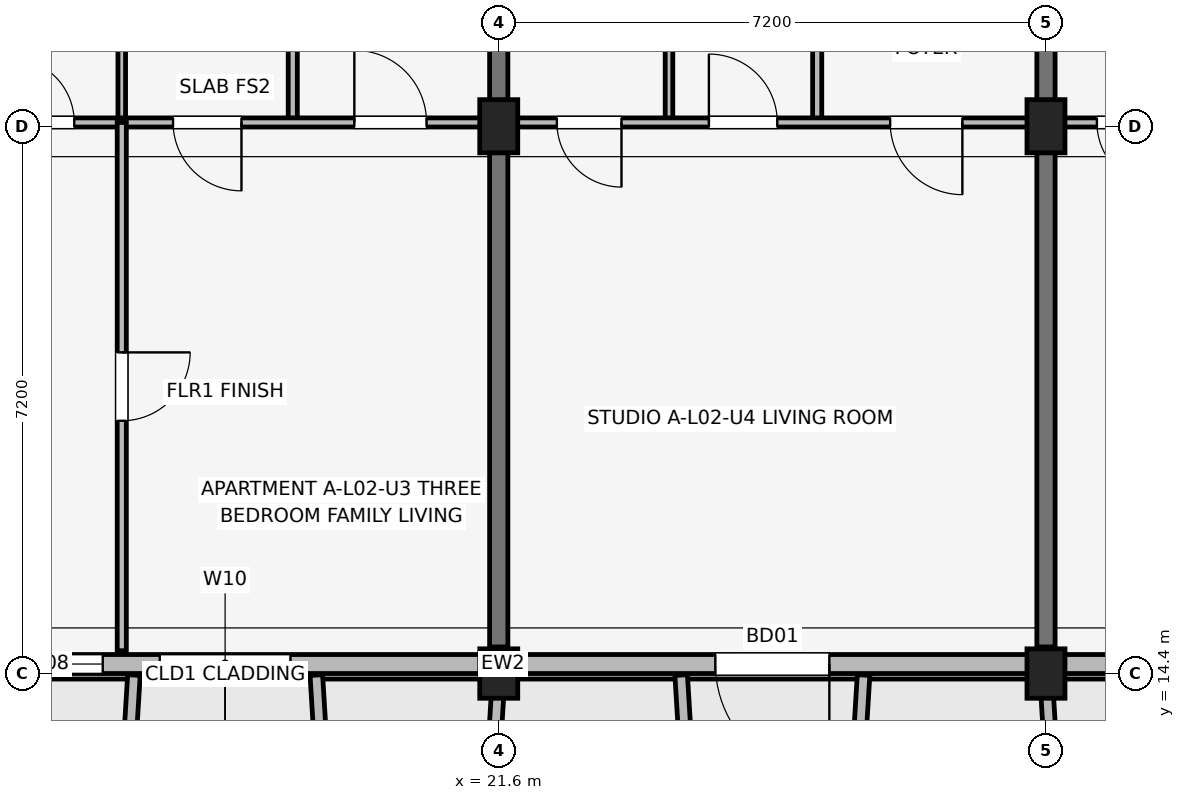
"""IFC4 building model, lengths in metres.
Left out: names, types, materials, properties, quantities, classifications, styles, units other than length and angle.
Written with IfcOpenShell. Run it as: python <this file> out.ifc"""

import sys

from ifc_helpers import new_model, si_unit, direction, frame, frame_2d, origin, origin_2d, place, context, subcontext, project, spatial, rectangle, extrude, element, fill, save


model = new_model("IFC4")
c1 = context("Model", 3, precision=1e-05, world=origin(), true_north=direction((0.0, 1.0)))
c2 = subcontext(c1, "Body", "Model", "MODEL_VIEW")
j1 = project(units=[si_unit("LENGTHUNIT", "METRE"), si_unit("PLANEANGLEUNIT", "RADIAN")], contexts=[c1])
p1 = place(None, origin())
s1 = spatial("IfcSite", under=j1, at=p1, CompositionType="ELEMENT")
p2 = place(p1, origin())
s2 = spatial("IfcBuilding", under=s1, at=p2, CompositionType="ELEMENT")
p3 = place(p2, frame((0.0, 0.0, 8.7)))
s3 = spatial("IfcBuildingStorey", under=s2, at=p3, CompositionType="ELEMENT", Elevation=8.7)
p4 = place(p3, frame((21.6, 14.4, 0.0), z_axis=(0.0, 0.0, 1.0), x_axis=(1.0, 0.0, 0.0)))
e1 = element("IfcColumn", 1, at=p4, inside=s3, PredefinedType="COLUMN", context=c2, shape_type="SweptSolid", body=[
    extrude(rectangle(XDim=0.5, YDim=0.65, at=origin_2d()), origin(), (0.0, 0.0, 1.0), 3.15),
])
p5 = place(p3, frame((21.6, 21.6, 0.0), z_axis=(0.0, 0.0, 1.0), x_axis=(1.0, 0.0, 0.0)))
e2 = element("IfcColumn", 2, at=p5, inside=s3, PredefinedType="COLUMN", context=c2, shape_type="SweptSolid", body=[
    extrude(rectangle(XDim=0.5, YDim=0.7, at=origin_2d()), origin(), (0.0, 0.0, 1.0), 3.15),
])
p6 = place(p3, frame((28.8, 14.4, 0.0), z_axis=(0.0, 0.0, 1.0), x_axis=(1.0, 0.0, 0.0)))
e3 = element("IfcColumn", 3, at=p6, inside=s3, PredefinedType="COLUMN", context=c2, shape_type="SweptSolid", body=[
    extrude(rectangle(XDim=0.5, YDim=0.65, at=origin_2d()), origin(), (0.0, 0.0, 1.0), 3.15),
])
p7 = place(p3, frame((28.8, 21.6, 0.0), z_axis=(0.0, 0.0, 1.0), x_axis=(1.0, 0.0, 0.0)))
e4 = element("IfcColumn", 4, at=p7, inside=s3, PredefinedType="COLUMN", context=c2, shape_type="SweptSolid", body=[
    extrude(rectangle(XDim=0.5, YDim=0.7, at=origin_2d()), origin(), (0.0, 0.0, 1.0), 3.15),
])
for number, where, z_axis, x_axis in (
    (5, (21.6, 14.75, 0.0), (0.0, 0.0, 1.0), (0.0, 1.0, 0.0)),
    (6, (28.8, 14.75, 0.0), (0.0, 0.0, 1.0), (0.0, 1.0, 0.0)),
):
    element("IfcWall", number, at=place(p3, frame(where, z_axis=z_axis, x_axis=x_axis)), inside=s3, PredefinedType="SHEAR", context=c2, shape_type="SweptSolid", body=[
        extrude(rectangle(XDim=9.4, YDim=0.24, at=frame_2d((4.7, 0.0))), origin(), (0.0, 0.0, 1.0), 3.15),
    ])
p8 = place(p3, frame((3.4, 14.525, 0.0), z_axis=(0.0, 0.0, 1.0), x_axis=(1.0, 0.0, 0.0)))
e7 = element("IfcWall", 7, at=p8, inside=s3, PredefinedType="SOLIDWALL", context=c2, shape_type="SweptSolid", body=[
    extrude(rectangle(XDim=29.2, YDim=0.25, at=frame_2d((14.6, 0.0))), origin(), (0.0, 0.0, 1.0), 2.43),
])
p9 = place(p8, frame((8.225, 0.0, 0.0), z_axis=(0.0, 0.0, 1.0), x_axis=(-1.0, 0.0, 0.0)))
e8 = element("IfcOpeningElement", 8, at=p9, cuts=e7, PredefinedType="OPENING", context=c2, shape_type="SweptSolid", body=[
    extrude(rectangle(XDim=1.65, YDim=2.15, at=frame_2d((0.825, 1.075))), frame((0.0, 0.135, 0.0), z_axis=(0.0, -1.0, 0.0), x_axis=(1.0, 0.0, 0.0)), (0.0, 0.0, 1.0), 0.27),
])
p10 = place(p8, frame((22.55, 0.0, 0.0), z_axis=(0.0, 0.0, 1.0), x_axis=(-1.0, 0.0, 0.0)))
e9 = element("IfcOpeningElement", 9, at=p10, cuts=e7, PredefinedType="OPENING", context=c2, shape_type="SweptSolid", body=[
    extrude(rectangle(XDim=1.5, YDim=2.15, at=frame_2d((0.75, 1.075))), frame((0.0, 0.135, 0.0), z_axis=(0.0, -1.0, 0.0), x_axis=(1.0, 0.0, 0.0)), (0.0, 0.0, 1.0), 0.27),
])
p11 = place(p8, frame((2.155, 0.0, 0.75)))
e10 = element("IfcOpeningElement", 10, at=p11, cuts=e7, PredefinedType="OPENING", context=c2, shape_type="SweptSolid", body=[
    extrude(rectangle(XDim=1.22, YDim=1.5, at=frame_2d((0.61, 0.75))), frame((0.0, 0.135, 0.0), z_axis=(0.0, -1.0, 0.0), x_axis=(1.0, 0.0, 0.0)), (0.0, 0.0, 1.0), 0.27),
])
p12 = place(p8, frame((4.39, 0.0, 0.75)))
e11 = element("IfcOpeningElement", 11, at=p12, cuts=e7, PredefinedType="OPENING", context=c2, shape_type="SweptSolid", body=[
    extrude(rectangle(XDim=1.34, YDim=1.55, at=frame_2d((0.67, 0.775))), frame((0.0, 0.135, 0.0), z_axis=(0.0, -1.0, 0.0), x_axis=(1.0, 0.0, 0.0)), (0.0, 0.0, 1.0), 0.27),
])
p13 = place(p8, frame((11.53, 0.0, 0.75)))
e12 = element("IfcOpeningElement", 12, at=p13, cuts=e7, PredefinedType="OPENING", context=c2, shape_type="SweptSolid", body=[
    extrude(rectangle(XDim=1.46, YDim=1.55, at=frame_2d((0.73, 0.775))), frame((0.0, 0.135, 0.0), z_axis=(0.0, -1.0, 0.0), x_axis=(1.0, 0.0, 0.0)), (0.0, 0.0, 1.0), 0.27),
])
p14 = place(p8, frame((13.74, 0.0, 0.7)))
e13 = element("IfcOpeningElement", 13, at=p14, cuts=e7, PredefinedType="OPENING", context=c2, shape_type="SweptSolid", body=[
    extrude(rectangle(XDim=1.72, YDim=1.6, at=frame_2d((0.86, 0.8))), frame((0.0, 0.135, 0.0), z_axis=(0.0, -1.0, 0.0), x_axis=(1.0, 0.0, 0.0)), (0.0, 0.0, 1.0), 0.27),
])
p15 = place(p8, frame((26.205, 0.0, 0.75)))
e14 = element("IfcOpeningElement", 14, at=p15, cuts=e7, PredefinedType="OPENING", context=c2, shape_type="SweptSolid", body=[
    extrude(rectangle(XDim=0.72, YDim=1.35, at=frame_2d((0.36, 0.675))), frame((0.0, 0.135, 0.0), z_axis=(0.0, -1.0, 0.0), x_axis=(1.0, 0.0, 0.0)), (0.0, 0.0, 1.0), 0.27),
])
for number, where, z_axis, x_axis in (
    (15, (16.8, 14.38, 0.0), (0.0, 0.0, 1.0), (-0.061, -0.998, 0.0)),
    (16, (19.2, 14.38, 0.0), (0.0, 0.0, 1.0), (0.061, -0.998, 0.0)),
):
    element("IfcWall", number, at=place(p3, frame(where, z_axis=z_axis, x_axis=x_axis)), inside=s3, PredefinedType="ELEMENTEDWALL", context=c2, shape_type="SweptSolid", body=[
        extrude(rectangle(XDim=1.964, YDim=0.165, at=frame_2d((0.982, 0.0))), origin(), (0.0, 0.0, 1.0), 2.58),
    ])
p16 = place(p3, frame((21.6, 14.38, 0.0), z_axis=(0.0, 0.0, 1.0), x_axis=(-0.061170732449, -0.998127317276, 0.0)))
e17 = element("IfcWall", 17, at=p16, inside=s3, PredefinedType="ELEMENTEDWALL", context=c2, shape_type="SweptSolid", body=[
    extrude(rectangle(XDim=1.964, YDim=0.165, at=frame_2d((0.982, 0.0))), origin(), (0.0, 0.0, 1.0), 2.95),
])
for number, where, z_axis, x_axis in (
    (18, (24.0, 14.38, 0.0), (0.0, 0.0, 1.0), (0.061, -0.998, 0.0)),
    (19, (26.4, 14.38, 0.0), (0.0, 0.0, 1.0), (-0.061, -0.998, 0.0)),
):
    element("IfcWall", number, at=place(p3, frame(where, z_axis=z_axis, x_axis=x_axis)), inside=s3, PredefinedType="ELEMENTEDWALL", context=c2, shape_type="SweptSolid", body=[
        extrude(rectangle(XDim=1.964, YDim=0.165, at=frame_2d((0.982, 0.0))), origin(), (0.0, 0.0, 1.0), 2.45),
    ])
p17 = place(p3, frame((28.8, 14.38, 0.0), z_axis=(0.0, 0.0, 1.0), x_axis=(0.061046865508, -0.998134900808, 0.0)))
e20 = element("IfcWall", 20, at=p17, inside=s3, PredefinedType="ELEMENTEDWALL", context=c2, shape_type="SweptSolid", body=[
    extrude(rectangle(XDim=1.964, YDim=0.165, at=frame_2d((0.982, 0.0))), origin(), (0.0, 0.0, 1.0), 2.95),
])
p18 = place(p3, frame((16.64, 21.65, 0.0), z_axis=(0.0, 0.0, 1.0), x_axis=(0.0, 1.0, 0.0)))
e21 = element("IfcWall", 21, at=p18, inside=s3, PredefinedType="PARTITIONING", context=c2, shape_type="SweptSolid", body=[
    extrude(rectangle(XDim=2.65, YDim=0.1, at=frame_2d((1.325, 0.0))), origin(), (0.0, 0.0, 1.0), 2.375),
])
p19 = place(p3, frame((18.89, 21.65, 0.0), z_axis=(0.0, 0.0, 1.0), x_axis=(0.0, 1.0, 0.0)))
e22 = element("IfcWall", 22, at=p19, inside=s3, PredefinedType="PARTITIONING", context=c2, shape_type="SweptSolid", body=[
    extrude(rectangle(XDim=2.65, YDim=0.12, at=frame_2d((1.325, 0.0))), origin(), (0.0, 0.0, 1.0), 2.375),
])
p20 = place(p3, frame((14.54, 21.65, 0.0), z_axis=(0.0, 0.0, 1.0), x_axis=(1.0, 0.0, 0.0)))
e23 = element("IfcWall", 23, at=p20, inside=s3, PredefinedType="PARTITIONING", context=c2, shape_type="SweptSolid", body=[
    extrude(rectangle(XDim=6.92, YDim=0.12, at=frame_2d((3.46, 0.0))), origin(), (0.0, 0.0, 1.0), 2.375),
])
p21 = place(p20, frame((0.625, 0.0, 0.0)))
e24 = element("IfcOpeningElement", 24, at=p21, cuts=e23, PredefinedType="OPENING", context=c2, shape_type="SweptSolid", body=[
    extrude(rectangle(XDim=0.85, YDim=2.08, at=frame_2d((0.425, 1.04))), frame((0.0, 0.07, 0.0), z_axis=(0.0, -1.0, 0.0), x_axis=(1.0, 0.0, 0.0)), (0.0, 0.0, 1.0), 0.14),
])
p22 = place(p20, frame((3.675, 0.0, 0.0), z_axis=(0.0, 0.0, 1.0), x_axis=(-1.0, 0.0, 0.0)))
e25 = element("IfcOpeningElement", 25, at=p22, cuts=e23, PredefinedType="OPENING", context=c2, shape_type="SweptSolid", body=[
    extrude(rectangle(XDim=0.9, YDim=2.08, at=frame_2d((0.45, 1.04))), frame((0.0, 0.07, 0.0), z_axis=(0.0, -1.0, 0.0), x_axis=(1.0, 0.0, 0.0)), (0.0, 0.0, 1.0), 0.14),
])
p23 = place(p20, frame((5.16, 0.0, 0.0)))
e26 = element("IfcOpeningElement", 26, at=p23, cuts=e23, PredefinedType="OPENING", context=c2, shape_type="SweptSolid", body=[
    extrude(rectangle(XDim=0.95, YDim=2.08, at=frame_2d((0.475, 1.04))), frame((0.0, 0.07, 0.0), z_axis=(0.0, -1.0, 0.0), x_axis=(1.0, 0.0, 0.0)), (0.0, 0.0, 1.0), 0.14),
])
p24 = place(p3, frame((16.64, 14.7, 0.0), z_axis=(0.0, 0.0, 1.0), x_axis=(0.0, 1.0, 0.0)))
e27 = element("IfcWall", 27, at=p24, inside=s3, PredefinedType="PARTITIONING", context=c2, shape_type="SweptSolid", body=[
    extrude(rectangle(XDim=6.95, YDim=0.12, at=frame_2d((3.475, 0.0))), origin(), (0.0, 0.0, 1.0), 2.375),
])
p25 = place(p24, frame((3.925, 0.0, 0.0), z_axis=(0.0, 0.0, 1.0), x_axis=(-1.0, 0.0, 0.0)))
e28 = element("IfcOpeningElement", 28, at=p25, cuts=e27, PredefinedType="OPENING", context=c2, shape_type="SweptSolid", body=[
    extrude(rectangle(XDim=0.9, YDim=2.08, at=frame_2d((0.45, 1.04))), frame((0.0, 0.07, 0.0), z_axis=(0.0, -1.0, 0.0), x_axis=(1.0, 0.0, 0.0)), (0.0, 0.0, 1.0), 0.14),
])
p26 = place(p3, frame((23.84, 21.65, 0.0), z_axis=(0.0, 0.0, 1.0), x_axis=(0.0, 1.0, 0.0)))
e29 = element("IfcWall", 29, at=p26, inside=s3, PredefinedType="PARTITIONING", context=c2, shape_type="SweptSolid", body=[
    extrude(rectangle(XDim=2.65, YDim=0.1, at=frame_2d((1.325, 0.0))), origin(), (0.0, 0.0, 1.0), 2.375),
])
p27 = place(p3, frame((25.79, 21.65, 0.0), z_axis=(0.0, 0.0, 1.0), x_axis=(0.0, 1.0, 0.0)))
e30 = element("IfcWall", 30, at=p27, inside=s3, PredefinedType="PARTITIONING", context=c2, shape_type="SweptSolid", body=[
    extrude(rectangle(XDim=2.65, YDim=0.12, at=frame_2d((1.325, 0.0))), origin(), (0.0, 0.0, 1.0), 2.375),
])
p28 = place(p3, frame((21.74, 21.65, 0.0), z_axis=(0.0, 0.0, 1.0), x_axis=(1.0, 0.0, 0.0)))
e31 = element("IfcWall", 31, at=p28, inside=s3, PredefinedType="PARTITIONING", context=c2, shape_type="SweptSolid", body=[
    extrude(rectangle(XDim=6.92, YDim=0.12, at=frame_2d((3.46, 0.0))), origin(), (0.0, 0.0, 1.0), 2.375),
])
p29 = place(p28, frame((1.475, 0.0, 0.0), z_axis=(0.0, 0.0, 1.0), x_axis=(-1.0, 0.0, 0.0)))
e32 = element("IfcOpeningElement", 32, at=p29, cuts=e31, PredefinedType="OPENING", context=c2, shape_type="SweptSolid", body=[
    extrude(rectangle(XDim=0.85, YDim=2.08, at=frame_2d((0.425, 1.04))), frame((0.0, 0.07, 0.0), z_axis=(0.0, -1.0, 0.0), x_axis=(1.0, 0.0, 0.0)), (0.0, 0.0, 1.0), 0.14),
])
p30 = place(p28, frame((2.625, 0.0, 0.0)))
e33 = element("IfcOpeningElement", 33, at=p30, cuts=e31, PredefinedType="OPENING", context=c2, shape_type="SweptSolid", body=[
    extrude(rectangle(XDim=0.9, YDim=2.08, at=frame_2d((0.45, 1.04))), frame((0.0, 0.07, 0.0), z_axis=(0.0, -1.0, 0.0), x_axis=(1.0, 0.0, 0.0)), (0.0, 0.0, 1.0), 0.14),
])
p31 = place(p28, frame((5.96, 0.0, 0.0), z_axis=(0.0, 0.0, 1.0), x_axis=(-1.0, 0.0, 0.0)))
e34 = element("IfcOpeningElement", 34, at=p31, cuts=e31, PredefinedType="OPENING", context=c2, shape_type="SweptSolid", body=[
    extrude(rectangle(XDim=0.95, YDim=2.08, at=frame_2d((0.475, 1.04))), frame((0.0, 0.07, 0.0), z_axis=(0.0, -1.0, 0.0), x_axis=(1.0, 0.0, 0.0)), (0.0, 0.0, 1.0), 0.14),
])
p32 = place(p3, frame((28.94, 21.65, 0.0), z_axis=(0.0, 0.0, 1.0), x_axis=(1.0, 0.0, 0.0)))
e35 = element("IfcWall", 35, at=p32, inside=s3, PredefinedType="PARTITIONING", context=c2, shape_type="SweptSolid", body=[
    extrude(rectangle(XDim=6.92, YDim=0.12, at=frame_2d((3.46, 0.0))), origin(), (0.0, 0.0, 1.0), 2.375),
])
p33 = place(p32, frame((1.38, 0.0, 0.0), z_axis=(0.0, 0.0, 1.0), x_axis=(-1.0, 0.0, 0.0)))
e36 = element("IfcOpeningElement", 36, at=p33, cuts=e35, PredefinedType="OPENING", context=c2, shape_type="SweptSolid", body=[
    extrude(rectangle(XDim=0.85, YDim=2.08, at=frame_2d((0.425, 1.04))), frame((0.0, 0.07, 0.0), z_axis=(0.0, -1.0, 0.0), x_axis=(1.0, 0.0, 0.0)), (0.0, 0.0, 1.0), 0.14),
])
p34 = place(p32, frame((2.285, 0.0, 0.0)))
e37 = element("IfcOpeningElement", 37, at=p34, cuts=e35, PredefinedType="OPENING", context=c2, shape_type="SweptSolid", body=[
    extrude(rectangle(XDim=0.9, YDim=2.08, at=frame_2d((0.45, 1.04))), frame((0.0, 0.07, 0.0), z_axis=(0.0, -1.0, 0.0), x_axis=(1.0, 0.0, 0.0)), (0.0, 0.0, 1.0), 0.14),
])
p35 = place(p32, frame((4.86, 0.0, 0.0), z_axis=(0.0, 0.0, 1.0), x_axis=(-1.0, 0.0, 0.0)))
e38 = element("IfcOpeningElement", 38, at=p35, cuts=e35, PredefinedType="OPENING", context=c2, shape_type="SweptSolid", body=[
    extrude(rectangle(XDim=0.95, YDim=2.08, at=frame_2d((0.475, 1.04))), frame((0.0, 0.07, 0.0), z_axis=(0.0, -1.0, 0.0), x_axis=(1.0, 0.0, 0.0)), (0.0, 0.0, 1.0), 0.14),
])
p36 = place(p10, origin())
e39 = element("IfcDoor", 39, at=p36, inside=s3, OperationType="SINGLE_SWING_RIGHT", PredefinedType="DOOR", context=c2, shape_type="SweptSolid", body=[
    extrude(rectangle(XDim=1.5, YDim=2.15, at=frame_2d((0.75, 1.075))), frame((0.0, 0.025, 0.0), z_axis=(0.0, -1.0, 0.0), x_axis=(1.0, 0.0, 0.0)), (0.0, 0.0, 1.0), 0.05),
])
fill(e9, e39)
p37 = place(p13, origin())
e40 = element("IfcWindow", 40, at=p37, inside=s3, PartitioningType="SINGLE_PANEL", PredefinedType="WINDOW", context=c2, shape_type="SweptSolid", body=[
    extrude(rectangle(XDim=1.46, YDim=1.55, at=frame_2d((0.73, 0.775))), frame((0.0, 0.03, 0.0), z_axis=(0.0, -1.0, 0.0), x_axis=(1.0, 0.0, 0.0)), (0.0, 0.0, 1.0), 0.06),
])
fill(e12, e40)
p38 = place(p14, origin())
e41 = element("IfcWindow", 41, at=p38, inside=s3, PartitioningType="SINGLE_PANEL", PredefinedType="WINDOW", context=c2, shape_type="SweptSolid", body=[
    extrude(rectangle(XDim=1.72, YDim=1.6, at=frame_2d((0.86, 0.8))), frame((0.0, 0.03, 0.0), z_axis=(0.0, -1.0, 0.0), x_axis=(1.0, 0.0, 0.0)), (0.0, 0.0, 1.0), 0.06),
])
fill(e13, e41)
p39 = place(p21, origin())
e42 = element("IfcDoor", 42, at=p39, inside=s3, OperationType="SINGLE_SWING_LEFT", PredefinedType="DOOR", context=c2, shape_type="SweptSolid", body=[
    extrude(rectangle(XDim=0.85, YDim=2.08, at=frame_2d((0.425, 1.04))), frame((0.0, 0.025, 0.0), z_axis=(0.0, -1.0, 0.0), x_axis=(1.0, 0.0, 0.0)), (0.0, 0.0, 1.0), 0.05),
])
fill(e24, e42)
p40 = place(p22, origin())
e43 = element("IfcDoor", 43, at=p40, inside=s3, OperationType="SINGLE_SWING_RIGHT", PredefinedType="DOOR", context=c2, shape_type="SweptSolid", body=[
    extrude(rectangle(XDim=0.9, YDim=2.08, at=frame_2d((0.45, 1.04))), frame((0.0, 0.025, 0.0), z_axis=(0.0, -1.0, 0.0), x_axis=(1.0, 0.0, 0.0)), (0.0, 0.0, 1.0), 0.05),
])
fill(e25, e43)
p41 = place(p23, origin())
e44 = element("IfcDoor", 44, at=p41, inside=s3, OperationType="SINGLE_SWING_LEFT", PredefinedType="DOOR", context=c2, shape_type="SweptSolid", body=[
    extrude(rectangle(XDim=0.95, YDim=2.08, at=frame_2d((0.475, 1.04))), frame((0.0, 0.025, 0.0), z_axis=(0.0, -1.0, 0.0), x_axis=(1.0, 0.0, 0.0)), (0.0, 0.0, 1.0), 0.05),
])
fill(e26, e44)
p42 = place(p25, origin())
e45 = element("IfcDoor", 45, at=p42, inside=s3, OperationType="SINGLE_SWING_RIGHT", PredefinedType="DOOR", context=c2, shape_type="SweptSolid", body=[
    extrude(rectangle(XDim=0.9, YDim=2.08, at=frame_2d((0.45, 1.04))), frame((0.0, 0.025, 0.0), z_axis=(0.0, -1.0, 0.0), x_axis=(1.0, 0.0, 0.0)), (0.0, 0.0, 1.0), 0.05),
])
fill(e28, e45)
p43 = place(p29, origin())
e46 = element("IfcDoor", 46, at=p43, inside=s3, OperationType="SINGLE_SWING_RIGHT", PredefinedType="DOOR", context=c2, shape_type="SweptSolid", body=[
    extrude(rectangle(XDim=0.85, YDim=2.08, at=frame_2d((0.425, 1.04))), frame((0.0, 0.025, 0.0), z_axis=(0.0, -1.0, 0.0), x_axis=(1.0, 0.0, 0.0)), (0.0, 0.0, 1.0), 0.05),
])
fill(e32, e46)
p44 = place(p30, origin())
e47 = element("IfcDoor", 47, at=p44, inside=s3, OperationType="SINGLE_SWING_LEFT", PredefinedType="DOOR", context=c2, shape_type="SweptSolid", body=[
    extrude(rectangle(XDim=0.9, YDim=2.08, at=frame_2d((0.45, 1.04))), frame((0.0, 0.025, 0.0), z_axis=(0.0, -1.0, 0.0), x_axis=(1.0, 0.0, 0.0)), (0.0, 0.0, 1.0), 0.05),
])
fill(e33, e47)
p45 = place(p31, origin())
e48 = element("IfcDoor", 48, at=p45, inside=s3, OperationType="SINGLE_SWING_RIGHT", PredefinedType="DOOR", context=c2, shape_type="SweptSolid", body=[
    extrude(rectangle(XDim=0.95, YDim=2.08, at=frame_2d((0.475, 1.04))), frame((0.0, 0.025, 0.0), z_axis=(0.0, -1.0, 0.0), x_axis=(1.0, 0.0, 0.0)), (0.0, 0.0, 1.0), 0.05),
])
fill(e34, e48)
p46 = place(p33, origin())
e49 = element("IfcDoor", 49, at=p46, inside=s3, OperationType="SINGLE_SWING_RIGHT", PredefinedType="DOOR", context=c2, shape_type="SweptSolid", body=[
    extrude(rectangle(XDim=0.85, YDim=2.08, at=frame_2d((0.425, 1.04))), frame((0.0, 0.025, 0.0), z_axis=(0.0, -1.0, 0.0), x_axis=(1.0, 0.0, 0.0)), (0.0, 0.0, 1.0), 0.05),
])
fill(e36, e49)
save(model, sys.argv[1])
